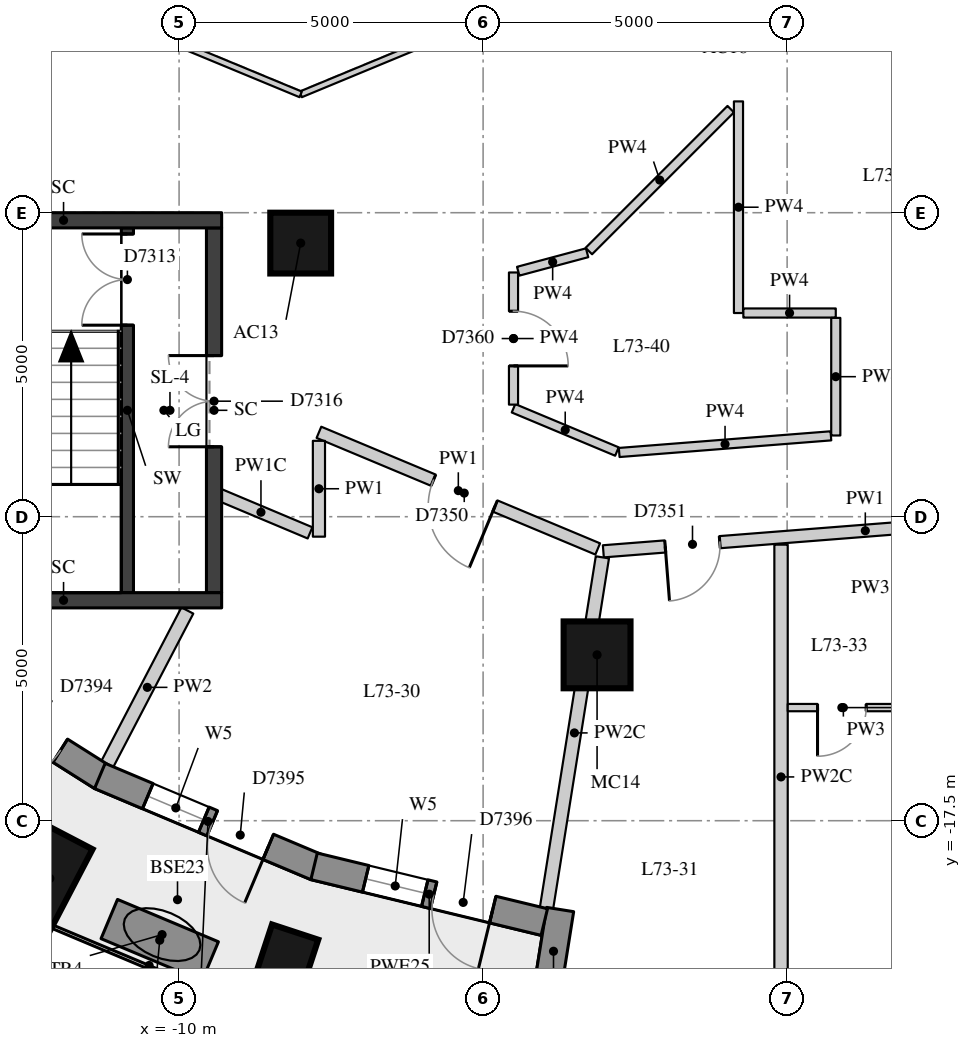
"""IFC4 building model, lengths in metres.
Left out: names, types, materials, properties, quantities, classifications, styles, units other than length and angle.
Written with IfcOpenShell. Run it as: python <this file> out.ifc"""

import sys

from ifc_helpers import new_model, si_unit, direction, frame, frame_2d, origin, origin_2d, place, context, subcontext, project, spatial, rectangle, extrude, element, fill, save


model = new_model("IFC4")
c1 = context("Model", 3, precision=1e-05, world=origin(), true_north=direction((0.0, 1.0)))
c2 = subcontext(c1, "Body", "Model", "MODEL_VIEW")
j1 = project(units=[si_unit("LENGTHUNIT", "METRE"), si_unit("PLANEANGLEUNIT", "RADIAN")], contexts=[c1])
p1 = place(None, origin())
s1 = spatial("IfcSite", under=j1, at=p1, CompositionType="ELEMENT")
p2 = place(p1, origin())
s2 = spatial("IfcBuilding", under=s1, at=p2, CompositionType="ELEMENT")
p3 = place(p2, frame((0.0, 0.0, 256.4)))
s3 = spatial("IfcBuildingStorey", under=s2, at=p3, CompositionType="ELEMENT", Elevation=256.4)
for number, where, z_axis, x_axis in (
    (1, (-12.125, -18.449, 0.0), (0.0, 0.0, 1.0), (-0.462, -0.887, 0.0)),
    (2, (-8.326, -20.044, 0.0), (0.0, 0.0, 1.0), (-0.312, -0.95, 0.0)),
):
    element("IfcColumn", number, at=place(p3, frame(where, z_axis=z_axis, x_axis=x_axis)), inside=s3, PredefinedType="COLUMN", context=c2, shape_type="SweptSolid", body=[
        extrude(rectangle(XDim=1.5, YDim=0.8, at=origin_2d()), origin(), (0.0, 0.0, 1.0), 3.3),
    ])
p4 = place(p3, frame((-8.0, -8.0, 0.0), z_axis=(0.0, 0.0, 1.0), x_axis=(1.0, 0.0, 0.0)))
e3 = element("IfcColumn", 3, at=p4, inside=s3, PredefinedType="COLUMN", context=c2, shape_type="SweptSolid", body=[
    extrude(rectangle(XDim=1.0, YDim=1.0, at=origin_2d()), origin(), (0.0, 0.0, 1.0), 3.3),
])
p5 = place(p3, frame((-3.126, -14.772, 0.0), z_axis=(0.0, 0.0, 1.0), x_axis=(1.0, 0.0, 0.0)))
e4 = element("IfcColumn", 4, at=p5, inside=s3, PredefinedType="COLUMN", context=c2, shape_type="SweptSolid", body=[
    extrude(rectangle(XDim=1.1, YDim=1.1, at=origin_2d()), origin(), (0.0, 0.0, 1.0), 3.3),
])
p6 = place(p3, frame((-3.951, -20.333, 0.0), z_axis=(0.0, 0.0, 1.0), x_axis=(0.157189016474, 0.9875685359, 0.0)))
e5 = element("IfcWall", 5, at=p6, inside=s3, PredefinedType="SOLIDWALL", context=c2, shape_type="SweptSolid", body=[
    extrude(rectangle(XDim=1.39, YDim=0.45, at=frame_2d((0.695, 0.0))), origin(), (0.0, 0.0, 1.0), 2.5),
])
p7 = place(p3, frame((-14.455, -14.767, 0.0), z_axis=(0.0, 0.0, 1.0), x_axis=(0.845183955488, -0.534475519912, 0.0)))
e6 = element("IfcWall", 6, at=p7, inside=s3, PredefinedType="SOLIDWALL", context=c2, shape_type="SweptSolid", body=[
    extrude(rectangle(XDim=3.769, YDim=0.45, at=frame_2d((1.884, 0.0))), origin(), (0.0, 0.0, 1.0), 2.95),
])
p8 = place(p7, frame((0.809, 0.0, 0.4)))
e7 = element("IfcOpeningElement", 7, at=p8, cuts=e6, PredefinedType="OPENING", context=c2, shape_type="SweptSolid", body=[
    extrude(rectangle(XDim=1.0, YDim=1.75, at=frame_2d((0.5, 0.875))), frame((0.0, 0.235, 0.0), z_axis=(0.0, -1.0, 0.0), x_axis=(1.0, 0.0, 0.0)), (0.0, 0.0, 1.0), 0.47),
])
p9 = place(p7, frame((1.959, 0.0, 0.0)))
e8 = element("IfcOpeningElement", 8, at=p9, cuts=e6, PredefinedType="OPENING", context=c2, shape_type="SweptSolid", body=[
    extrude(rectangle(XDim=1.0, YDim=2.15, at=frame_2d((0.5, 1.075))), frame((0.0, 0.235, 0.0), z_axis=(0.0, -1.0, 0.0), x_axis=(1.0, 0.0, 0.0)), (0.0, 0.0, 1.0), 0.47),
])
p10 = place(p3, frame((-11.303, -16.764, 0.0), z_axis=(0.0, 0.0, 1.0), x_axis=(0.921625850704, -0.388079619813, 0.0)))
e9 = element("IfcWall", 9, at=p10, inside=s3, PredefinedType="SOLIDWALL", context=c2, shape_type="SweptSolid", body=[
    extrude(rectangle(XDim=3.86, YDim=0.45, at=frame_2d((1.93, 0.0))), origin(), (0.0, 0.0, 1.0), 2.95),
])
p11 = place(p10, frame((0.855, 0.0, 0.4)))
e10 = element("IfcOpeningElement", 10, at=p11, cuts=e9, PredefinedType="OPENING", context=c2, shape_type="SweptSolid", body=[
    extrude(rectangle(XDim=1.0, YDim=1.75, at=frame_2d((0.5, 0.875))), frame((0.0, 0.235, 0.0), z_axis=(0.0, -1.0, 0.0), x_axis=(1.0, 0.0, 0.0)), (0.0, 0.0, 1.0), 0.47),
])
p12 = place(p10, frame((2.005, 0.0, 0.0)))
e11 = element("IfcOpeningElement", 11, at=p12, cuts=e9, PredefinedType="OPENING", context=c2, shape_type="SweptSolid", body=[
    extrude(rectangle(XDim=1.0, YDim=2.15, at=frame_2d((0.5, 1.075))), frame((0.0, 0.235, 0.0), z_axis=(0.0, -1.0, 0.0), x_axis=(1.0, 0.0, 0.0)), (0.0, 0.0, 1.0), 0.47),
])
p13 = place(p3, frame((-7.78, -18.25, 0.0), z_axis=(0.0, 0.0, 1.0), x_axis=(0.971943523304, -0.235214343755, 0.0)))
e12 = element("IfcWall", 12, at=p13, inside=s3, PredefinedType="SOLIDWALL", context=c2, shape_type="SweptSolid", body=[
    extrude(rectangle(XDim=3.896, YDim=0.45, at=frame_2d((1.948, 0.0))), origin(), (0.0, 0.0, 1.0), 2.95),
])
p14 = place(p13, frame((0.873, 0.0, 0.4)))
e13 = element("IfcOpeningElement", 13, at=p14, cuts=e12, PredefinedType="OPENING", context=c2, shape_type="SweptSolid", body=[
    extrude(rectangle(XDim=1.0, YDim=1.75, at=frame_2d((0.5, 0.875))), frame((0.0, 0.235, 0.0), z_axis=(0.0, -1.0, 0.0), x_axis=(1.0, 0.0, 0.0)), (0.0, 0.0, 1.0), 0.47),
])
p15 = place(p13, frame((2.023, 0.0, 0.0)))
e14 = element("IfcOpeningElement", 14, at=p15, cuts=e12, PredefinedType="OPENING", context=c2, shape_type="SweptSolid", body=[
    extrude(rectangle(XDim=1.0, YDim=2.15, at=frame_2d((0.5, 1.075))), frame((0.0, 0.235, 0.0), z_axis=(0.0, -1.0, 0.0), x_axis=(1.0, 0.0, 0.0)), (0.0, 0.0, 1.0), 0.47),
])
p16 = place(p3, frame((-11.148, -19.117, 0.0), z_axis=(0.0, 0.0, 1.0), x_axis=(0.922038267928, -0.387098737374, 0.0)))
e15 = element("IfcWall", 15, at=p16, inside=s3, PredefinedType="USERDEFINED", context=c2, shape_type="SweptSolid", body=[
    extrude(rectangle(XDim=1.8, YDim=0.7, at=frame_2d((0.9, 0.0))), origin(), (0.0, 0.0, 1.0), 0.75),
])
p17 = place(p3, frame((-10.85, -13.75, 0.0), z_axis=(0.0, 0.0, 1.0), x_axis=(0.0, 1.0, 0.0)))
e16 = element("IfcWall", 16, at=p17, inside=s3, PredefinedType="SHEAR", context=c2, shape_type="SweptSolid", body=[
    extrude(rectangle(XDim=6.0, YDim=0.2, at=frame_2d((3.0, 0.0))), origin(), (0.0, 0.0, 1.0), 2.95),
])
p18 = place(p17, frame((4.4, 0.0, 0.0)))
e17 = element("IfcOpeningElement", 17, at=p18, cuts=e16, PredefinedType="OPENING", context=c2, shape_type="SweptSolid", body=[
    extrude(rectangle(XDim=1.5, YDim=2.1, at=frame_2d((0.75, 1.05))), frame((0.0, 0.11, 0.0), z_axis=(0.0, -1.0, 0.0), x_axis=(1.0, 0.0, 0.0)), (0.0, 0.0, 1.0), 0.22),
])
p19 = place(p3, frame((-9.425, -13.75, -0.28), z_axis=(0.0, 0.0, 1.0), x_axis=(0.0, 1.0, 0.0)))
e18 = element("IfcWall", 18, at=p19, inside=s3, PredefinedType="SHEAR", context=c2, shape_type="SweptSolid", body=[
    extrude(rectangle(XDim=6.0, YDim=0.25, at=frame_2d((3.0, 0.0))), origin(), (0.0, 0.0, 1.0), 3.23),
])
p20 = place(p19, frame((2.4, 0.0, 0.28)))
e19 = element("IfcOpeningElement", 19, at=p20, cuts=e18, PredefinedType="OPENING", context=c2, shape_type="SweptSolid", body=[
    extrude(rectangle(XDim=1.5, YDim=2.1, at=frame_2d((0.75, 1.05))), frame((0.0, 0.135, 0.0), z_axis=(0.0, -1.0, 0.0), x_axis=(1.0, 0.0, 0.0)), (0.0, 0.0, 1.0), 0.27),
])
for number, where, z_axis, x_axis in (
    (20, (-14.5, -7.625, -0.28), (0.0, 0.0, 1.0), (1.0, 0.0, 0.0)),
    (21, (-14.5, -13.875, -0.28), (0.0, 0.0, 1.0), (1.0, 0.0, 0.0)),
):
    element("IfcWall", number, at=place(p3, frame(where, z_axis=z_axis, x_axis=x_axis)), inside=s3, PredefinedType="SHEAR", context=c2, shape_type="SweptSolid", body=[
        extrude(rectangle(XDim=5.2, YDim=0.25, at=frame_2d((2.6, 0.0))), origin(), (0.0, 0.0, 1.0), 3.23),
    ])
p21 = place(p3, frame((5.594, -12.392, 0.0), z_axis=(0.0, 0.0, 1.0), x_axis=(-0.996925151721, -0.078359695423, 0.0)))
e22 = element("IfcWall", 22, at=p21, inside=s3, PredefinedType="PARTITIONING", context=c2, shape_type="SweptSolid", body=[
    extrude(rectangle(XDim=8.643, YDim=0.2, at=frame_2d((4.321, 0.0))), origin(), (0.0, 0.0, 1.0), 2.95),
])
p22 = place(p21, frame((6.722, 0.0, 0.0)))
e23 = element("IfcOpeningElement", 23, at=p22, cuts=e22, PredefinedType="OPENING", context=c2, shape_type="SweptSolid", body=[
    extrude(rectangle(XDim=0.9, YDim=2.1, at=frame_2d((0.45, 1.05))), frame((0.0, 0.11, 0.0), z_axis=(0.0, -1.0, 0.0), x_axis=(1.0, 0.0, 0.0)), (0.0, 0.0, 1.0), 0.22),
])
p23 = place(p21, frame((2.309, 0.0, 0.0)))
e24 = element("IfcOpeningElement", 24, at=p23, cuts=e22, PredefinedType="OPENING", context=c2, shape_type="SweptSolid", body=[
    extrude(rectangle(XDim=1.1, YDim=2.1, at=frame_2d((0.55, 1.05))), frame((0.0, 0.11, 0.0), z_axis=(0.0, -1.0, 0.0), x_axis=(1.0, 0.0, 0.0)), (0.0, 0.0, 1.0), 0.22),
])
p24 = place(p3, frame((-3.115, -13.03, 0.0), z_axis=(0.0, 0.0, 1.0), x_axis=(-0.922510557065, 0.385971854031, 0.0)))
e25 = element("IfcWall", 25, at=p24, inside=s3, PredefinedType="PARTITIONING", context=c2, shape_type="SweptSolid", body=[
    extrude(rectangle(XDim=4.97, YDim=0.2, at=frame_2d((2.485, 0.0))), origin(), (0.0, 0.0, 1.0), 2.95),
])
p25 = place(p24, frame((1.829, 0.0, 0.0)))
e26 = element("IfcOpeningElement", 26, at=p25, cuts=e25, PredefinedType="OPENING", context=c2, shape_type="SweptSolid", body=[
    extrude(rectangle(XDim=1.1, YDim=2.1, at=frame_2d((0.55, 1.05))), frame((0.0, 0.11, 0.0), z_axis=(0.0, -1.0, 0.0), x_axis=(1.0, 0.0, 0.0)), (0.0, 0.0, 1.0), 0.22),
])
p26 = place(p3, frame((-7.7, -11.252, 0.0), z_axis=(0.0, 0.0, 1.0), x_axis=(0.0, -1.0, 0.0)))
e27 = element("IfcWall", 27, at=p26, inside=s3, PredefinedType="PARTITIONING", context=c2, shape_type="SweptSolid", body=[
    extrude(rectangle(XDim=1.576, YDim=0.2, at=frame_2d((0.788, 0.0))), origin(), (0.0, 0.0, 1.0), 2.95),
])
p27 = place(p3, frame((-7.846, -12.766, 0.0), z_axis=(0.0, 0.0, 1.0), x_axis=(-0.921813756196, 0.387633072489, 0.0)))
e28 = element("IfcWall", 28, at=p27, inside=s3, PredefinedType="PARTITIONING", context=c2, shape_type="SweptSolid", body=[
    extrude(rectangle(XDim=1.751, YDim=0.2, at=frame_2d((0.875, 0.0))), origin(), (0.0, 0.0, 1.0), 2.5),
])
p28 = place(p3, frame((-0.8, -5.669, 0.0), z_axis=(0.0, 0.0, 1.0), x_axis=(0.0, -1.0, 0.0)))
e29 = element("IfcWall", 29, at=p28, inside=s3, PredefinedType="PARTITIONING", context=c2, shape_type="SweptSolid", body=[
    extrude(rectangle(XDim=3.48, YDim=0.15, at=frame_2d((1.74, 0.0))), origin(), (0.0, 0.0, 1.0), 2.95),
])
p29 = place(p3, frame((-0.72, -9.15, 0.0), z_axis=(0.0, 0.0, 1.0), x_axis=(1.0, 0.0, 0.0)))
e30 = element("IfcWall", 30, at=p29, inside=s3, PredefinedType="PARTITIONING", context=c2, shape_type="SweptSolid", body=[
    extrude(rectangle(XDim=1.52, YDim=0.15, at=frame_2d((0.76, 0.0))), origin(), (0.0, 0.0, 1.0), 2.95),
])
p30 = place(p3, frame((0.8, -9.23, 0.0), z_axis=(0.0, 0.0, 1.0), x_axis=(0.0, -1.0, 0.0)))
e31 = element("IfcWall", 31, at=p30, inside=s3, PredefinedType="PARTITIONING", context=c2, shape_type="SweptSolid", body=[
    extrude(rectangle(XDim=1.934, YDim=0.15, at=frame_2d((0.967, 0.0))), origin(), (0.0, 0.0, 1.0), 2.95),
])
p31 = place(p3, frame((0.72, -11.17, 0.0), z_axis=(0.0, 0.0, 1.0), x_axis=(-0.996919759383, -0.078428268828, 0.0)))
e32 = element("IfcWall", 32, at=p31, inside=s3, PredefinedType="PARTITIONING", context=c2, shape_type="SweptSolid", body=[
    extrude(rectangle(XDim=3.493, YDim=0.15, at=frame_2d((1.746, 0.0))), origin(), (0.0, 0.0, 1.0), 2.95),
])
p32 = place(p3, frame((-2.799, -11.428, 0.0), z_axis=(0.0, 0.0, 1.0), x_axis=(-0.922507880735, 0.385978250659, 0.0)))
e33 = element("IfcWall", 33, at=p32, inside=s3, PredefinedType="PARTITIONING", context=c2, shape_type="SweptSolid", body=[
    extrude(rectangle(XDim=1.844, YDim=0.15, at=frame_2d((0.922, 0.0))), origin(), (0.0, 0.0, 1.0), 2.95),
])
p33 = place(p3, frame((-4.5, -10.656, 0.0), z_axis=(0.0, 0.0, 1.0), x_axis=(0.0, 1.0, 0.0)))
e34 = element("IfcWall", 34, at=p33, inside=s3, PredefinedType="PARTITIONING", context=c2, shape_type="SweptSolid", body=[
    extrude(rectangle(XDim=2.173, YDim=0.15, at=frame_2d((1.087, 0.0))), origin(), (0.0, 0.0, 1.0), 2.95),
])
p34 = place(p33, frame((0.637, 0.0, 0.0)))
e35 = element("IfcOpeningElement", 35, at=p34, cuts=e34, PredefinedType="OPENING", context=c2, shape_type="SweptSolid", body=[
    extrude(rectangle(XDim=0.9, YDim=2.1, at=frame_2d((0.45, 1.05))), frame((0.0, 0.085, 0.0), z_axis=(0.0, -1.0, 0.0), x_axis=(1.0, 0.0, 0.0)), (0.0, 0.0, 1.0), 0.17),
])
p35 = place(p3, frame((-4.423, -8.463, 0.0), z_axis=(0.0, 0.0, 1.0), x_axis=(0.965916469839, 0.258853961327, 0.0)))
e36 = element("IfcWall", 36, at=p35, inside=s3, PredefinedType="PARTITIONING", context=c2, shape_type="SweptSolid", body=[
    extrude(rectangle(XDim=1.173, YDim=0.15, at=frame_2d((0.587, 0.0))), origin(), (0.0, 0.0, 1.0), 2.95),
])
p36 = place(p3, frame((-3.261, -8.131, 0.0), z_axis=(0.0, 0.0, 1.0), x_axis=(0.707106781187, 0.707106781187, 0.0)))
e37 = element("IfcWall", 37, at=p36, inside=s3, PredefinedType="PARTITIONING", context=c2, shape_type="SweptSolid", body=[
    extrude(rectangle(XDim=3.3, YDim=0.15, at=frame_2d((1.65, 0.0))), origin(), (0.0, 0.0, 1.0), 2.95),
])
p37 = place(p3, frame((-11.181, -16.571, 0.0), z_axis=(0.0, 0.0, 1.0), x_axis=(0.462325972726, 0.886710039947, 0.0)))
e38 = element("IfcWall", 38, at=p37, inside=s3, PredefinedType="PARTITIONING", context=c2, shape_type="SweptSolid", body=[
    extrude(rectangle(XDim=2.851, YDim=0.22, at=frame_2d((1.425, 0.0))), origin(), (0.0, 0.0, 1.0), 2.95),
])
p38 = place(p3, frame((-3.958, -18.944, 0.0), z_axis=(0.0, 0.0, 1.0), x_axis=(0.157252920937, 0.987558362253, 0.0)))
e39 = element("IfcWall", 39, at=p38, inside=s3, PredefinedType="PARTITIONING", context=c2, shape_type="SweptSolid", body=[
    extrude(rectangle(XDim=5.848, YDim=0.22, at=frame_2d((2.924, 0.0))), origin(), (0.0, 0.0, 1.0), 2.5),
])
p39 = place(p3, frame((-0.1, -20.6, 0.0), z_axis=(0.0, 0.0, 1.0), x_axis=(0.0, 1.0, 0.0)))
e40 = element("IfcWall", 40, at=p39, inside=s3, PredefinedType="PARTITIONING", context=c2, shape_type="SweptSolid", body=[
    extrude(rectangle(XDim=7.64, YDim=0.22, at=frame_2d((3.82, 0.0))), origin(), (0.0, 0.0, 1.0), 2.5),
])
p40 = place(p3, frame((1.84, -15.64, 0.0), z_axis=(0.0, 0.0, 1.0), x_axis=(-1.0, 0.0, 0.0)))
e41 = element("IfcWall", 41, at=p40, inside=s3, PredefinedType="PARTITIONING", context=c2, shape_type="SweptSolid", body=[
    extrude(rectangle(XDim=1.83, YDim=0.12, at=frame_2d((0.915, 0.0))), origin(), (0.0, 0.0, 1.0), 2.95),
])
p41 = place(p40, frame((0.54, 0.0, 0.0)))
e42 = element("IfcOpeningElement", 42, at=p41, cuts=e41, PredefinedType="OPENING", context=c2, shape_type="SweptSolid", body=[
    extrude(rectangle(XDim=0.8, YDim=2.1, at=frame_2d((0.4, 1.05))), frame((0.0, 0.07, 0.0), z_axis=(0.0, -1.0, 0.0), x_axis=(1.0, 0.0, 0.0)), (0.0, 0.0, 1.0), 0.14),
])
for number, where, z_axis, x_axis in (
    (43, (-4.073, -3.927, 0.0), (0.0, 0.0, 1.0), (-0.924, -0.383, 0.0)),
    (44, (-8.0, -5.554, 0.0), (0.0, 0.0, 1.0), (-0.924, 0.383, 0.0)),
):
    element("IfcWall", number, at=place(p3, frame(where, z_axis=z_axis, x_axis=x_axis)), inside=s3, PredefinedType="PARTITIONING", context=c2, shape_type="SweptSolid", body=[
        extrude(rectangle(XDim=4.251, YDim=0.1, at=frame_2d((2.125, 0.0))), origin(), (0.0, 0.0, 1.0), 2.95),
    ])
p42 = place(p9, frame((1.0, 0.0, 0.0), z_axis=(0.0, 0.0, 1.0), x_axis=(-1.0, 0.0, 0.0)))
e45 = element("IfcDoor", 45, at=p42, inside=s3, OperationType="SINGLE_SWING_RIGHT", PredefinedType="DOOR", context=c2, shape_type="SweptSolid", body=[
    extrude(rectangle(XDim=1.0, YDim=2.15, at=frame_2d((0.5, 1.075))), frame((0.0, 0.075, 0.0), z_axis=(0.0, -1.0, 0.0), x_axis=(1.0, 0.0, 0.0)), (0.0, 0.0, 1.0), 0.05),
])
fill(e8, e45)
p43 = place(p11, origin())
e46 = element("IfcWindow", 46, at=p43, inside=s3, PartitioningType="SINGLE_PANEL", PredefinedType="WINDOW", context=c2, shape_type="SweptSolid", body=[
    extrude(rectangle(XDim=1.0, YDim=1.75, at=frame_2d((0.5, 0.875))), frame((0.0, 0.035, 0.0), z_axis=(0.0, -1.0, 0.0), x_axis=(1.0, 0.0, 0.0)), (0.0, 0.0, 1.0), 0.06),
])
fill(e10, e46)
p44 = place(p12, frame((1.0, 0.0, 0.0), z_axis=(0.0, 0.0, 1.0), x_axis=(-1.0, 0.0, 0.0)))
e47 = element("IfcDoor", 47, at=p44, inside=s3, OperationType="SINGLE_SWING_LEFT", PredefinedType="DOOR", context=c2, shape_type="SweptSolid", body=[
    extrude(rectangle(XDim=1.0, YDim=2.15, at=frame_2d((0.5, 1.075))), frame((0.0, 0.075, 0.0), z_axis=(0.0, -1.0, 0.0), x_axis=(1.0, 0.0, 0.0)), (0.0, 0.0, 1.0), 0.05),
])
fill(e11, e47)
p45 = place(p14, origin())
e48 = element("IfcWindow", 48, at=p45, inside=s3, PartitioningType="SINGLE_PANEL", PredefinedType="WINDOW", context=c2, shape_type="SweptSolid", body=[
    extrude(rectangle(XDim=1.0, YDim=1.75, at=frame_2d((0.5, 0.875))), frame((0.0, 0.035, 0.0), z_axis=(0.0, -1.0, 0.0), x_axis=(1.0, 0.0, 0.0)), (0.0, 0.0, 1.0), 0.06),
])
fill(e13, e48)
p46 = place(p15, frame((1.0, 0.0, 0.0), z_axis=(0.0, 0.0, 1.0), x_axis=(-1.0, 0.0, 0.0)))
e49 = element("IfcDoor", 49, at=p46, inside=s3, OperationType="SINGLE_SWING_LEFT", PredefinedType="DOOR", context=c2, shape_type="SweptSolid", body=[
    extrude(rectangle(XDim=1.0, YDim=2.15, at=frame_2d((0.5, 1.075))), frame((0.0, 0.075, 0.0), z_axis=(0.0, -1.0, 0.0), x_axis=(1.0, 0.0, 0.0)), (0.0, 0.0, 1.0), 0.05),
])
fill(e14, e49)
p47 = place(p18, origin())
e50 = element("IfcDoor", 50, at=p47, inside=s3, OperationType="DOUBLE_DOOR_SINGLE_SWING", PredefinedType="DOOR", context=c2, shape_type="SweptSolid", body=[
    extrude(rectangle(XDim=1.5, YDim=2.1, at=frame_2d((0.75, 1.05))), frame((0.0, 0.025, 0.0), z_axis=(0.0, -1.0, 0.0), x_axis=(1.0, 0.0, 0.0)), (0.0, 0.0, 1.0), 0.05),
])
fill(e17, e50)
p48 = place(p20, origin())
e51 = element("IfcDoor", 51, at=p48, inside=s3, OperationType="DOUBLE_DOOR_SINGLE_SWING", PredefinedType="DOOR", context=c2, shape_type="SweptSolid", body=[
    extrude(rectangle(XDim=1.5, YDim=2.1, at=frame_2d((0.75, 1.05))), frame((0.0, 0.025, 0.0), z_axis=(0.0, -1.0, 0.0), x_axis=(1.0, 0.0, 0.0)), (0.0, 0.0, 1.0), 0.05),
])
fill(e19, e51)
p49 = place(p25, origin())
e52 = element("IfcDoor", 52, at=p49, inside=s3, OperationType="SINGLE_SWING_LEFT", PredefinedType="DOOR", context=c2, shape_type="SweptSolid", body=[
    extrude(rectangle(XDim=1.1, YDim=2.1, at=frame_2d((0.55, 1.05))), frame((0.0, 0.025, 0.0), z_axis=(0.0, -1.0, 0.0), x_axis=(1.0, 0.0, 0.0)), (0.0, 0.0, 1.0), 0.05),
])
fill(e26, e52)
p50 = place(p22, origin())
e53 = element("IfcDoor", 53, at=p50, inside=s3, OperationType="SINGLE_SWING_RIGHT", PredefinedType="DOOR", context=c2, shape_type="SweptSolid", body=[
    extrude(rectangle(XDim=0.9, YDim=2.1, at=frame_2d((0.45, 1.05))), frame((0.0, 0.025, 0.0), z_axis=(0.0, -1.0, 0.0), x_axis=(1.0, 0.0, 0.0)), (0.0, 0.0, 1.0), 0.05),
])
fill(e23, e53)
p51 = place(p41, origin())
e54 = element("IfcDoor", 54, at=p51, inside=s3, OperationType="SINGLE_SWING_RIGHT", PredefinedType="DOOR", context=c2, shape_type="SweptSolid", body=[
    extrude(rectangle(XDim=0.8, YDim=2.1, at=frame_2d((0.4, 1.05))), frame((0.0, 0.025, 0.0), z_axis=(0.0, -1.0, 0.0), x_axis=(1.0, 0.0, 0.0)), (0.0, 0.0, 1.0), 0.05),
])
fill(e42, e54)
p52 = place(p34, origin())
e55 = element("IfcDoor", 55, at=p52, inside=s3, OperationType="SINGLE_SWING_RIGHT", PredefinedType="DOOR", context=c2, shape_type="SweptSolid", body=[
    extrude(rectangle(XDim=0.9, YDim=2.1, at=frame_2d((0.45, 1.05))), frame((0.0, 0.025, 0.0), z_axis=(0.0, -1.0, 0.0), x_axis=(1.0, 0.0, 0.0)), (0.0, 0.0, 1.0), 0.05),
])
fill(e35, e55)
save(model, sys.argv[1])
